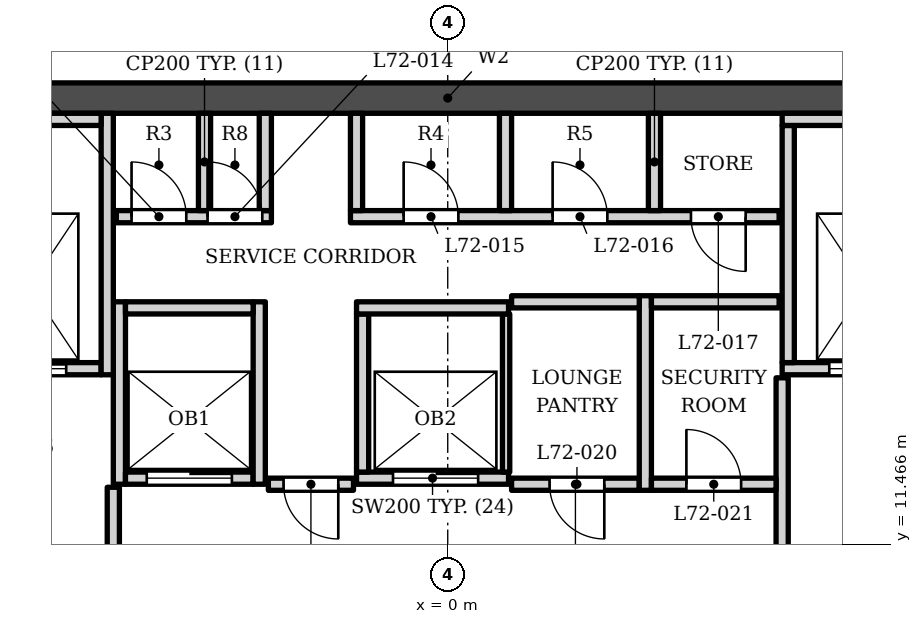
"""IFC4 building model, lengths in metres.
Left out: names, types, materials, properties, quantities, classifications, styles, units other than length and angle.
Written with IfcOpenShell. Run it as: python <this file> out.ifc"""

import sys

from ifc_helpers import new_model, si_unit, direction, frame, frame_2d, origin, place, context, subcontext, project, spatial, rectangle, extrude, element, fill, save


model = new_model("IFC4")
c1 = context("Model", 3, precision=1e-05, world=origin(), true_north=direction((0.0, 1.0)))
c2 = subcontext(c1, "Body", "Model", "MODEL_VIEW")
j1 = project(units=[si_unit("LENGTHUNIT", "METRE"), si_unit("PLANEANGLEUNIT", "RADIAN")], contexts=[c1])
p1 = place(None, origin())
s1 = spatial("IfcSite", under=j1, at=p1, CompositionType="ELEMENT")
p2 = place(p1, origin())
s2 = spatial("IfcBuilding", under=s1, at=p2, CompositionType="ELEMENT")
p3 = place(p2, frame((0.0, 0.0, 302.5)))
s3 = spatial("IfcBuildingStorey", under=s2, at=p3, CompositionType="ELEMENT", Elevation=302.5)
p4 = place(p3, frame((-12.1, 18.802, 0.0), z_axis=(0.0, 0.0, 1.0), x_axis=(1.0, 0.0, 0.0)))
e1 = element("IfcWall", 1, at=p4, inside=s3, PredefinedType="SHEAR", context=c2, shape_type="SweptSolid", body=[
    extrude(rectangle(XDim=24.2, YDim=0.5, at=frame_2d((12.1, 0.0))), origin(), (0.0, 0.0, 1.0), 8.0),
])
p5 = place(p3, frame((-5.5, 6.353, 0.0), z_axis=(0.0, 0.0, 1.0), x_axis=(0.0, 1.0, 0.0)))
e2 = element("IfcWall", 2, at=p5, inside=s3, PredefinedType="SOLIDWALL", context=c2, shape_type="SweptSolid", body=[
    extrude(rectangle(XDim=6.05, YDim=0.2, at=frame_2d((3.025, 0.0))), origin(), (0.0, 0.0, 1.0), 7.8),
])
p6 = place(p5, frame((3.6, 0.0, 0.0)))
e3 = element("IfcOpeningElement", 3, at=p6, cuts=e2, PredefinedType="OPENING", context=c2, shape_type="SweptSolid", body=[
    extrude(rectangle(XDim=1.4, YDim=2.1, at=frame_2d((0.7, 1.05))), frame((0.0, 0.11, 0.0), z_axis=(0.0, -1.0, 0.0), x_axis=(1.0, 0.0, 0.0)), (0.0, 0.0, 1.0), 0.22),
])
p7 = place(p3, frame((5.5, 6.353, 0.0), z_axis=(0.0, 0.0, 1.0), x_axis=(0.0, 1.0, 0.0)))
e4 = element("IfcWall", 4, at=p7, inside=s3, PredefinedType="SOLIDWALL", context=c2, shape_type="SweptSolid", body=[
    extrude(rectangle(XDim=7.85, YDim=0.2, at=frame_2d((3.925, 0.0))), origin(), (0.0, 0.0, 1.0), 7.8),
])
p8 = place(p7, frame((3.6, 0.0, 0.0)))
e5 = element("IfcOpeningElement", 5, at=p8, cuts=e4, PredefinedType="OPENING", context=c2, shape_type="SweptSolid", body=[
    extrude(rectangle(XDim=1.4, YDim=2.1, at=frame_2d((0.7, 1.05))), frame((0.0, 0.11, 0.0), z_axis=(0.0, -1.0, 0.0), x_axis=(1.0, 0.0, 0.0)), (0.0, 0.0, 1.0), 0.22),
])
p9 = place(p3, frame((-2.95, 12.453, 0.0), z_axis=(0.0, 0.0, 1.0), x_axis=(1.0, 0.0, 0.0)))
e6 = element("IfcWall", 6, at=p9, inside=s3, PredefinedType="SOLIDWALL", context=c2, shape_type="SweptSolid", body=[
    extrude(rectangle(XDim=1.4, YDim=0.2, at=frame_2d((0.7, 0.0))), origin(), (0.0, 0.0, 1.0), 7.8),
])
p10 = place(p9, frame((0.25, 0.0, 0.0)))
e7 = element("IfcOpeningElement", 7, at=p10, cuts=e6, PredefinedType="OPENING", context=c2, shape_type="SweptSolid", body=[
    extrude(rectangle(XDim=0.9, YDim=2.1, at=frame_2d((0.45, 1.05))), frame((0.0, 0.11, 0.0), z_axis=(0.0, -1.0, 0.0), x_axis=(1.0, 0.0, 0.0)), (0.0, 0.0, 1.0), 0.22),
])
p11 = place(p3, frame((1.05, 12.453, 0.0), z_axis=(0.0, 0.0, 1.0), x_axis=(1.0, 0.0, 0.0)))
e8 = element("IfcWall", 8, at=p11, inside=s3, PredefinedType="SOLIDWALL", context=c2, shape_type="SweptSolid", body=[
    extrude(rectangle(XDim=2.1, YDim=0.2, at=frame_2d((1.05, 0.0))), origin(), (0.0, 0.0, 1.0), 7.8),
])
p12 = place(p11, frame((0.625, 0.0, 0.0)))
e9 = element("IfcOpeningElement", 9, at=p12, cuts=e8, PredefinedType="OPENING", context=c2, shape_type="SweptSolid", body=[
    extrude(rectangle(XDim=0.9, YDim=2.1, at=frame_2d((0.45, 1.05))), frame((0.0, 0.11, 0.0), z_axis=(0.0, -1.0, 0.0), x_axis=(1.0, 0.0, 0.0)), (0.0, 0.0, 1.0), 0.22),
])
p13 = place(p3, frame((3.25, 12.353, 0.0), z_axis=(0.0, 0.0, 1.0), x_axis=(0.0, 1.0, 0.0)))
e10 = element("IfcWall", 10, at=p13, inside=s3, PredefinedType="PARTITIONING", context=c2, shape_type="SweptSolid", body=[
    extrude(rectangle(XDim=3.2, YDim=0.2, at=frame_2d((1.6, 0.0))), origin(), (0.0, 0.0, 1.0), 7.8),
])
p14 = place(p3, frame((3.35, 12.453, 0.0), z_axis=(0.0, 0.0, 1.0), x_axis=(1.0, 0.0, 0.0)))
e11 = element("IfcWall", 11, at=p14, inside=s3, PredefinedType="PARTITIONING", context=c2, shape_type="SweptSolid", body=[
    extrude(rectangle(XDim=2.05, YDim=0.2, at=frame_2d((1.025, 0.0))), origin(), (0.0, 0.0, 1.0), 7.8),
])
p15 = place(p14, frame((0.575, 0.0, 0.0)))
e12 = element("IfcOpeningElement", 12, at=p15, cuts=e11, PredefinedType="OPENING", context=c2, shape_type="SweptSolid", body=[
    extrude(rectangle(XDim=0.9, YDim=2.1, at=frame_2d((0.45, 1.05))), frame((0.0, 0.11, 0.0), z_axis=(0.0, -1.0, 0.0), x_axis=(1.0, 0.0, 0.0)), (0.0, 0.0, 1.0), 0.22),
])
p16 = place(p3, frame((-5.4, 12.453, 0.0), z_axis=(0.0, 0.0, 1.0), x_axis=(0.0, 1.0, 0.0)))
e13 = element("IfcWall", 13, at=p16, inside=s3, PredefinedType="SOLIDWALL", context=c2, shape_type="SweptSolid", body=[
    extrude(rectangle(XDim=3.0, YDim=0.2, at=frame_2d((1.5, 0.0))), origin(), (0.0, 0.0, 1.0), 7.8),
])
p17 = place(p3, frame((-5.3, 12.552, 0.0), z_axis=(0.0, 0.0, 1.0), x_axis=(1.0, 0.0, 0.0)))
e14 = element("IfcWall", 14, at=p17, inside=s3, PredefinedType="SOLIDWALL", context=c2, shape_type="SweptSolid", body=[
    extrude(rectangle(XDim=2.1, YDim=0.2, at=frame_2d((1.05, 0.0))), origin(), (0.0, 0.0, 1.0), 7.8),
])
p18 = place(p17, frame((0.35, 0.0, 0.0)))
e15 = element("IfcOpeningElement", 15, at=p18, cuts=e14, PredefinedType="OPENING", context=c2, shape_type="SweptSolid", body=[
    extrude(rectangle(XDim=1.4, YDim=2.4, at=frame_2d((0.7, 1.2))), frame((0.0, 0.11, 0.0), z_axis=(0.0, -1.0, 0.0), x_axis=(1.0, 0.0, 0.0)), (0.0, 0.0, 1.0), 0.22),
])
p19 = place(p3, frame((-3.1, 12.453, 0.0), z_axis=(0.0, 0.0, 1.0), x_axis=(0.0, 1.0, 0.0)))
e16 = element("IfcWall", 16, at=p19, inside=s3, PredefinedType="SOLIDWALL", context=c2, shape_type="SweptSolid", body=[
    extrude(rectangle(XDim=3.0, YDim=0.2, at=frame_2d((1.5, 0.0))), origin(), (0.0, 0.0, 1.0), 7.8),
])
p20 = place(p3, frame((-1.5, 12.552, 0.0), z_axis=(0.0, 0.0, 1.0), x_axis=(1.0, 0.0, 0.0)))
e17 = element("IfcWall", 17, at=p20, inside=s3, PredefinedType="SOLIDWALL", context=c2, shape_type="SweptSolid", body=[
    extrude(rectangle(XDim=2.5, YDim=0.2, at=frame_2d((1.25, 0.0))), origin(), (0.0, 0.0, 1.0), 7.8),
])
p21 = place(p20, frame((0.6, 0.0, 0.0)))
e18 = element("IfcOpeningElement", 18, at=p21, cuts=e17, PredefinedType="OPENING", context=c2, shape_type="SweptSolid", body=[
    extrude(rectangle(XDim=1.4, YDim=2.4, at=frame_2d((0.7, 1.2))), frame((0.0, 0.11, 0.0), z_axis=(0.0, -1.0, 0.0), x_axis=(1.0, 0.0, 0.0)), (0.0, 0.0, 1.0), 0.22),
])
p22 = place(p3, frame((-1.4, 12.653, 0.0), z_axis=(0.0, 0.0, 1.0), x_axis=(0.0, 1.0, 0.0)))
e19 = element("IfcWall", 19, at=p22, inside=s3, PredefinedType="SOLIDWALL", context=c2, shape_type="SweptSolid", body=[
    extrude(rectangle(XDim=2.6, YDim=0.2, at=frame_2d((1.3, 0.0))), origin(), (0.0, 0.0, 1.0), 7.8),
])
p23 = place(p3, frame((0.96, 12.653, 0.0), z_axis=(0.0, 0.0, 1.0), x_axis=(0.0, 1.0, 0.0)))
e20 = element("IfcWall", 20, at=p23, inside=s3, PredefinedType="SOLIDWALL", context=c2, shape_type="SweptSolid", body=[
    extrude(rectangle(XDim=2.6, YDim=0.12, at=frame_2d((1.3, 0.0))), origin(), (0.0, 0.0, 1.0), 7.8),
])
p24 = place(p3, frame((-8.05, 14.353, 0.0), z_axis=(0.0, 0.0, 1.0), x_axis=(1.0, 0.0, 0.0)))
e21 = element("IfcWall", 21, at=p24, inside=s3, PredefinedType="SOLIDWALL", context=c2, shape_type="SweptSolid", body=[
    extrude(rectangle(XDim=2.35, YDim=0.2, at=frame_2d((1.175, 0.0))), origin(), (0.0, 0.0, 1.0), 7.8),
])
p25 = place(p24, frame((0.575, 0.0, 0.0)))
e22 = element("IfcOpeningElement", 22, at=p25, cuts=e21, PredefinedType="OPENING", context=c2, shape_type="SweptSolid", body=[
    extrude(rectangle(XDim=1.2, YDim=2.1, at=frame_2d((0.6, 1.05))), frame((0.0, 0.11, 0.0), z_axis=(0.0, -1.0, 0.0), x_axis=(1.0, 0.0, 0.0)), (0.0, 0.0, 1.0), 0.22),
])
p26 = place(p3, frame((-5.6, 14.253, 0.0), z_axis=(0.0, 0.0, 1.0), x_axis=(0.0, 1.0, 0.0)))
e23 = element("IfcWall", 23, at=p26, inside=s3, PredefinedType="SOLIDWALL", context=c2, shape_type="SweptSolid", body=[
    extrude(rectangle(XDim=4.3, YDim=0.2, at=frame_2d((2.15, 0.0))), origin(), (0.0, 0.0, 1.0), 7.8),
])
p27 = place(p3, frame((5.5, 14.353, 0.0), z_axis=(0.0, 0.0, 1.0), x_axis=(1.0, 0.0, 0.0)))
e24 = element("IfcWall", 24, at=p27, inside=s3, PredefinedType="SOLIDWALL", context=c2, shape_type="SweptSolid", body=[
    extrude(rectangle(XDim=2.55, YDim=0.2, at=frame_2d((1.275, 0.0))), origin(), (0.0, 0.0, 1.0), 7.8),
])
p28 = place(p27, frame((0.775, 0.0, 0.0)))
e25 = element("IfcOpeningElement", 25, at=p28, cuts=e24, PredefinedType="OPENING", context=c2, shape_type="SweptSolid", body=[
    extrude(rectangle(XDim=1.2, YDim=2.1, at=frame_2d((0.6, 1.05))), frame((0.0, 0.11, 0.0), z_axis=(0.0, -1.0, 0.0), x_axis=(1.0, 0.0, 0.0)), (0.0, 0.0, 1.0), 0.22),
])
p29 = place(p3, frame((5.6, 14.453, 0.0), z_axis=(0.0, 0.0, 1.0), x_axis=(0.0, 1.0, 0.0)))
e26 = element("IfcWall", 26, at=p29, inside=s3, PredefinedType="SOLIDWALL", context=c2, shape_type="SweptSolid", body=[
    extrude(rectangle(XDim=3.9, YDim=0.2, at=frame_2d((1.95, 0.0))), origin(), (0.0, 0.0, 1.0), 7.8),
])
p30 = place(p3, frame((-5.3, 15.353, 0.0), z_axis=(0.0, 0.0, 1.0), x_axis=(1.0, 0.0, 0.0)))
e27 = element("IfcWall", 27, at=p30, inside=s3, PredefinedType="SOLIDWALL", context=c2, shape_type="SweptSolid", body=[
    extrude(rectangle(XDim=2.1, YDim=0.2, at=frame_2d((1.05, 0.0))), origin(), (0.0, 0.0, 1.0), 7.8),
])
p31 = place(p3, frame((-1.5, 15.353, 0.0), z_axis=(0.0, 0.0, 1.0), x_axis=(1.0, 0.0, 0.0)))
e28 = element("IfcWall", 28, at=p31, inside=s3, PredefinedType="SOLIDWALL", context=c2, shape_type="SweptSolid", body=[
    extrude(rectangle(XDim=2.5, YDim=0.2, at=frame_2d((1.25, 0.0))), origin(), (0.0, 0.0, 1.0), 7.8),
])
for number, where, z_axis, x_axis in (
    (29, (1.05, 15.453, 0.0), (0.0, 0.0, 1.0), (1.0, 0.0, 0.0)),
    (30, (3.35, 15.453, 0.0), (0.0, 0.0, 1.0), (1.0, 0.0, 0.0)),
):
    element("IfcWall", number, at=place(p3, frame(where, z_axis=z_axis, x_axis=x_axis)), inside=s3, PredefinedType="SOLIDWALL", context=c2, shape_type="SweptSolid", body=[
        extrude(rectangle(XDim=2.1, YDim=0.2, at=frame_2d((1.05, 0.0))), origin(), (0.0, 0.0, 1.0), 7.8),
    ])
p32 = place(p3, frame((-5.45, 16.853, 0.0), z_axis=(0.0, 0.0, 1.0), x_axis=(1.0, 0.0, 0.0)))
e31 = element("IfcWall", 31, at=p32, inside=s3, PredefinedType="SOLIDWALL", context=c2, shape_type="SweptSolid", body=[
    extrude(rectangle(XDim=2.55, YDim=0.2, at=frame_2d((1.275, 0.0))), origin(), (0.0, 0.0, 1.0), 7.8),
])
p33 = place(p32, frame((0.25, 0.0, 0.0)))
e32 = element("IfcOpeningElement", 32, at=p33, cuts=e31, PredefinedType="OPENING", context=c2, shape_type="SweptSolid", body=[
    extrude(rectangle(XDim=0.9, YDim=2.1, at=frame_2d((0.45, 1.05))), frame((0.0, 0.11, 0.0), z_axis=(0.0, -1.0, 0.0), x_axis=(1.0, 0.0, 0.0)), (0.0, 0.0, 1.0), 0.22),
])
p34 = place(p32, frame((1.5, 0.0, 0.0)))
e33 = element("IfcOpeningElement", 33, at=p34, cuts=e31, PredefinedType="OPENING", context=c2, shape_type="SweptSolid", body=[
    extrude(rectangle(XDim=0.9, YDim=2.1, at=frame_2d((0.45, 1.05))), frame((0.0, 0.11, 0.0), z_axis=(0.0, -1.0, 0.0), x_axis=(1.0, 0.0, 0.0)), (0.0, 0.0, 1.0), 0.22),
])
p35 = place(p3, frame((-1.6, 16.853, 0.0), z_axis=(0.0, 0.0, 1.0), x_axis=(1.0, 0.0, 0.0)))
e34 = element("IfcWall", 34, at=p35, inside=s3, PredefinedType="SOLIDWALL", context=c2, shape_type="SweptSolid", body=[
    extrude(rectangle(XDim=7.05, YDim=0.2, at=frame_2d((3.525, 0.0))), origin(), (0.0, 0.0, 1.0), 7.8),
])
p36 = place(p35, frame((0.875, 0.0, 0.0)))
e35 = element("IfcOpeningElement", 35, at=p36, cuts=e34, PredefinedType="OPENING", context=c2, shape_type="SweptSolid", body=[
    extrude(rectangle(XDim=0.9, YDim=2.1, at=frame_2d((0.45, 1.05))), frame((0.0, 0.11, 0.0), z_axis=(0.0, -1.0, 0.0), x_axis=(1.0, 0.0, 0.0)), (0.0, 0.0, 1.0), 0.22),
])
p37 = place(p35, frame((3.325, 0.0, 0.0)))
e36 = element("IfcOpeningElement", 36, at=p37, cuts=e34, PredefinedType="OPENING", context=c2, shape_type="SweptSolid", body=[
    extrude(rectangle(XDim=0.9, YDim=2.1, at=frame_2d((0.45, 1.05))), frame((0.0, 0.11, 0.0), z_axis=(0.0, -1.0, 0.0), x_axis=(1.0, 0.0, 0.0)), (0.0, 0.0, 1.0), 0.22),
])
p38 = place(p35, frame((5.6, 0.0, 0.0)))
e37 = element("IfcOpeningElement", 37, at=p38, cuts=e34, PredefinedType="OPENING", context=c2, shape_type="SweptSolid", body=[
    extrude(rectangle(XDim=0.9, YDim=2.1, at=frame_2d((0.45, 1.05))), frame((0.0, 0.11, 0.0), z_axis=(0.0, -1.0, 0.0), x_axis=(1.0, 0.0, 0.0)), (0.0, 0.0, 1.0), 0.22),
])
for number, where, z_axis, x_axis in (
    (38, (-4.0, 16.953, 0.0), (0.0, 0.0, 1.0), (0.0, 1.0, 0.0)),
    (39, (-3.0, 16.953, 0.0), (0.0, 0.0, 1.0), (0.0, 1.0, 0.0)),
    (40, (-1.5, 16.953, 0.0), (0.0, 0.0, 1.0), (0.0, 1.0, 0.0)),
    (41, (0.95, 16.953, 0.0), (0.0, 0.0, 1.0), (0.0, 1.0, 0.0)),
    (42, (3.4, 16.953, 0.0), (0.0, 0.0, 1.0), (0.0, 1.0, 0.0)),
):
    element("IfcWall", number, at=place(p3, frame(where, z_axis=z_axis, x_axis=x_axis)), inside=s3, PredefinedType="PARTITIONING", context=c2, shape_type="SweptSolid", body=[
        extrude(rectangle(XDim=1.6, YDim=0.2, at=frame_2d((0.8, 0.0))), origin(), (0.0, 0.0, 1.0), 7.8),
    ])
p39 = place(p3, frame((-8.05, 18.453, 0.0), z_axis=(0.0, 0.0, 1.0), x_axis=(1.0, 0.0, 0.0)))
e43 = element("IfcWall", 43, at=p39, inside=s3, PredefinedType="SOLIDWALL", context=c2, shape_type="SweptSolid", body=[
    extrude(rectangle(XDim=2.35, YDim=0.2, at=frame_2d((1.175, 0.0))), origin(), (0.0, 0.0, 1.0), 7.8),
])
p40 = place(p3, frame((5.5, 18.453, 0.0), z_axis=(0.0, 0.0, 1.0), x_axis=(1.0, 0.0, 0.0)))
e44 = element("IfcWall", 44, at=p40, inside=s3, PredefinedType="SOLIDWALL", context=c2, shape_type="SweptSolid", body=[
    extrude(rectangle(XDim=2.55, YDim=0.2, at=frame_2d((1.275, 0.0))), origin(), (0.0, 0.0, 1.0), 7.8),
])
p41 = place(p18, origin())
e45 = element("IfcDoor", 45, at=p41, inside=s3, OperationType="DOUBLE_DOOR_SLIDING", PredefinedType="DOOR", context=c2, shape_type="SweptSolid", body=[
    extrude(rectangle(XDim=1.4, YDim=2.4, at=frame_2d((0.7, 1.2))), frame((0.0, 0.025, 0.0), z_axis=(0.0, -1.0, 0.0), x_axis=(1.0, 0.0, 0.0)), (0.0, 0.0, 1.0), 0.05),
])
fill(e15, e45)
p42 = place(p21, origin())
e46 = element("IfcDoor", 46, at=p42, inside=s3, OperationType="DOUBLE_DOOR_SLIDING", PredefinedType="DOOR", context=c2, shape_type="SweptSolid", body=[
    extrude(rectangle(XDim=1.4, YDim=2.4, at=frame_2d((0.7, 1.2))), frame((0.0, 0.025, 0.0), z_axis=(0.0, -1.0, 0.0), x_axis=(1.0, 0.0, 0.0)), (0.0, 0.0, 1.0), 0.05),
])
fill(e18, e46)
p43 = place(p25, origin())
e47 = element("IfcDoor", 47, at=p43, inside=s3, OperationType="DOUBLE_DOOR_SLIDING", PredefinedType="DOOR", context=c2, shape_type="SweptSolid", body=[
    extrude(rectangle(XDim=1.2, YDim=2.1, at=frame_2d((0.6, 1.05))), frame((0.0, 0.025, 0.0), z_axis=(0.0, -1.0, 0.0), x_axis=(1.0, 0.0, 0.0)), (0.0, 0.0, 1.0), 0.05),
])
fill(e22, e47)
p44 = place(p28, origin())
e48 = element("IfcDoor", 48, at=p44, inside=s3, OperationType="DOUBLE_DOOR_SLIDING", PredefinedType="DOOR", context=c2, shape_type="SweptSolid", body=[
    extrude(rectangle(XDim=1.2, YDim=2.1, at=frame_2d((0.6, 1.05))), frame((0.0, 0.025, 0.0), z_axis=(0.0, -1.0, 0.0), x_axis=(1.0, 0.0, 0.0)), (0.0, 0.0, 1.0), 0.05),
])
fill(e25, e48)
p45 = place(p10, origin())
e49 = element("IfcDoor", 49, at=p45, inside=s3, OperationType="SINGLE_SWING_RIGHT", PredefinedType="DOOR", context=c2, shape_type="SweptSolid", body=[
    extrude(rectangle(XDim=0.9, YDim=2.1, at=frame_2d((0.45, 1.05))), frame((0.0, 0.025, 0.0), z_axis=(0.0, -1.0, 0.0), x_axis=(1.0, 0.0, 0.0)), (0.0, 0.0, 1.0), 0.05),
])
fill(e7, e49)
p46 = place(p33, origin())
e50 = element("IfcDoor", 50, at=p46, inside=s3, OperationType="SINGLE_SWING_LEFT", PredefinedType="DOOR", context=c2, shape_type="SweptSolid", body=[
    extrude(rectangle(XDim=0.9, YDim=2.1, at=frame_2d((0.45, 1.05))), frame((0.0, 0.025, 0.0), z_axis=(0.0, -1.0, 0.0), x_axis=(1.0, 0.0, 0.0)), (0.0, 0.0, 1.0), 0.05),
])
fill(e32, e50)
p47 = place(p34, origin())
e51 = element("IfcDoor", 51, at=p47, inside=s3, OperationType="SINGLE_SWING_LEFT", PredefinedType="DOOR", context=c2, shape_type="SweptSolid", body=[
    extrude(rectangle(XDim=0.9, YDim=2.1, at=frame_2d((0.45, 1.05))), frame((0.0, 0.025, 0.0), z_axis=(0.0, -1.0, 0.0), x_axis=(1.0, 0.0, 0.0)), (0.0, 0.0, 1.0), 0.05),
])
fill(e33, e51)
p48 = place(p36, origin())
e52 = element("IfcDoor", 52, at=p48, inside=s3, OperationType="SINGLE_SWING_LEFT", PredefinedType="DOOR", context=c2, shape_type="SweptSolid", body=[
    extrude(rectangle(XDim=0.9, YDim=2.1, at=frame_2d((0.45, 1.05))), frame((0.0, 0.025, 0.0), z_axis=(0.0, -1.0, 0.0), x_axis=(1.0, 0.0, 0.0)), (0.0, 0.0, 1.0), 0.05),
])
fill(e35, e52)
p49 = place(p37, origin())
e53 = element("IfcDoor", 53, at=p49, inside=s3, OperationType="SINGLE_SWING_LEFT", PredefinedType="DOOR", context=c2, shape_type="SweptSolid", body=[
    extrude(rectangle(XDim=0.9, YDim=2.1, at=frame_2d((0.45, 1.05))), frame((0.0, 0.025, 0.0), z_axis=(0.0, -1.0, 0.0), x_axis=(1.0, 0.0, 0.0)), (0.0, 0.0, 1.0), 0.05),
])
fill(e36, e53)
p50 = place(p38, origin())
e54 = element("IfcDoor", 54, at=p50, inside=s3, OperationType="SINGLE_SWING_RIGHT", PredefinedType="DOOR", context=c2, shape_type="SweptSolid", body=[
    extrude(rectangle(XDim=0.9, YDim=2.1, at=frame_2d((0.45, 1.05))), frame((0.0, 0.025, 0.0), z_axis=(0.0, -1.0, 0.0), x_axis=(1.0, 0.0, 0.0)), (0.0, 0.0, 1.0), 0.05),
])
fill(e37, e54)
p51 = place(p12, origin())
e55 = element("IfcDoor", 55, at=p51, inside=s3, OperationType="SINGLE_SWING_RIGHT", PredefinedType="DOOR", context=c2, shape_type="SweptSolid", body=[
    extrude(rectangle(XDim=0.9, YDim=2.1, at=frame_2d((0.45, 1.05))), frame((0.0, 0.025, 0.0), z_axis=(0.0, -1.0, 0.0), x_axis=(1.0, 0.0, 0.0)), (0.0, 0.0, 1.0), 0.05),
])
fill(e9, e55)
p52 = place(p15, origin())
e56 = element("IfcDoor", 56, at=p52, inside=s3, OperationType="SINGLE_SWING_LEFT", PredefinedType="DOOR", context=c2, shape_type="SweptSolid", body=[
    extrude(rectangle(XDim=0.9, YDim=2.1, at=frame_2d((0.45, 1.05))), frame((0.0, 0.025, 0.0), z_axis=(0.0, -1.0, 0.0), x_axis=(1.0, 0.0, 0.0)), (0.0, 0.0, 1.0), 0.05),
])
fill(e12, e56)
save(model, sys.argv[1])
